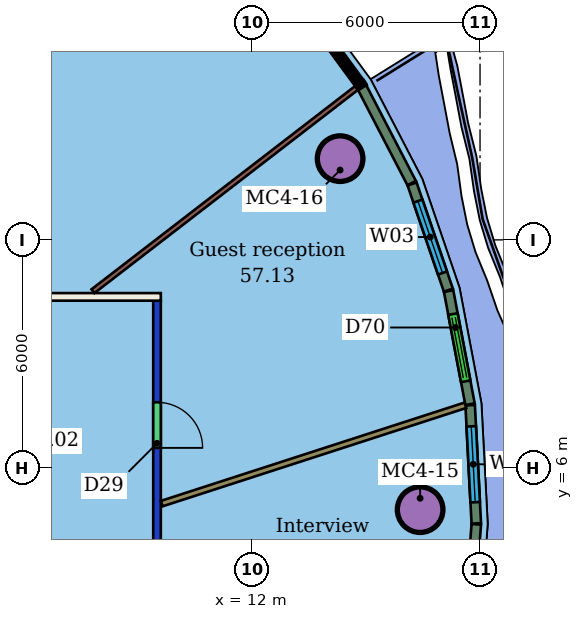
"""IFC4 building model, lengths in metres.
Left out: names, types, materials, properties, quantities, classifications, styles, units other than length and angle.
Written with IfcOpenShell. Run it as: python <this file> out.ifc"""

import sys

from ifc_helpers import new_model, si_unit, direction, frame, frame_2d, origin, origin_2d, place, context, subcontext, project, spatial, rectangle, hollow_circle, extrude, element, fill, save


model = new_model("IFC4")
c1 = context("Model", 3, precision=1e-05, world=origin(), true_north=direction((0.0, 1.0)))
c2 = subcontext(c1, "Body", "Model", "MODEL_VIEW")
j1 = project(units=[si_unit("LENGTHUNIT", "METRE"), si_unit("PLANEANGLEUNIT", "RADIAN")], contexts=[c1])
p1 = place(None, origin())
s1 = spatial("IfcSite", under=j1, at=p1, CompositionType="ELEMENT")
p2 = place(p1, origin())
s2 = spatial("IfcBuilding", under=s1, at=p2, CompositionType="ELEMENT")
p3 = place(p2, frame((0.0, 0.0, 231.7)))
s3 = spatial("IfcBuildingStorey", under=s2, at=p3, CompositionType="ELEMENT", Elevation=231.7)
for number, where, z_axis, x_axis in (
    (1, (16.424, 4.901, 0.0), (0.0, 0.0, 1.0), (1.0, 0.0, 0.0)),
    (2, (14.318, 14.137, 0.0), (0.0, 0.0, 1.0), (1.0, 0.0, 0.0)),
):
    element("IfcColumn", number, at=place(p3, frame(where, z_axis=z_axis, x_axis=x_axis)), inside=s3, PredefinedType="COLUMN", context=c2, shape_type="SweptSolid", body=[
        extrude(hollow_circle(Radius=0.6, WallThickness=0.045, at=origin_2d()), origin(), (0.0, 0.0, 1.0), 3.45),
    ])
p4 = place(p3, frame((-21.6, 10.5, 0.0), z_axis=(0.0, 0.0, 1.0), x_axis=(1.0, 0.0, 0.0)))
e3 = element("IfcWall", 3, at=p4, inside=s3, PredefinedType="PARTITIONING", context=c2, shape_type="SweptSolid", body=[
    extrude(rectangle(XDim=31.2, YDim=0.2, at=frame_2d((15.6, 0.0))), origin(), (0.0, 0.0, 1.0), 3.45),
])
p5 = place(p4, frame((10.934, 0.0, 0.0)))
e4 = element("IfcOpeningElement", 4, at=p5, cuts=e3, PredefinedType="OPENING", context=c2, shape_type="SweptSolid", body=[
    extrude(rectangle(XDim=1.0, YDim=2.4, at=frame_2d((0.5, 1.2))), frame((0.0, 0.11, 0.0), z_axis=(0.0, -1.0, 0.0), x_axis=(1.0, 0.0, 0.0)), (0.0, 0.0, 1.0), 0.22),
])
p6 = place(p4, frame((5.542, 0.0, 0.0)))
e5 = element("IfcOpeningElement", 5, at=p6, cuts=e3, PredefinedType="OPENING", context=c2, shape_type="SweptSolid", body=[
    extrude(rectangle(XDim=0.9, YDim=2.1, at=frame_2d((0.45, 1.05))), frame((0.0, 0.11, 0.0), z_axis=(0.0, -1.0, 0.0), x_axis=(1.0, 0.0, 0.0)), (0.0, 0.0, 1.0), 0.22),
])
p7 = place(p4, frame((19.472, 0.0, 0.0)))
e6 = element("IfcOpeningElement", 6, at=p7, cuts=e3, PredefinedType="OPENING", context=c2, shape_type="SweptSolid", body=[
    extrude(rectangle(XDim=1.8, YDim=2.1, at=frame_2d((0.9, 1.05))), frame((0.0, 0.11, 0.0), z_axis=(0.0, -1.0, 0.0), x_axis=(1.0, 0.0, 0.0)), (0.0, 0.0, 1.0), 0.22),
])
p8 = place(p3, frame((9.5, 10.4, 0.0), z_axis=(0.0, 0.0, 1.0), x_axis=(0.0, -1.0, 0.0)))
e7 = element("IfcWall", 7, at=p8, inside=s3, PredefinedType="PARTITIONING", context=c2, shape_type="SweptSolid", body=[
    extrude(rectangle(XDim=20.8, YDim=0.2, at=frame_2d((10.4, 0.0))), origin(), (0.0, 0.0, 1.0), 3.05),
])
p9 = place(p8, frame((15.989, 0.0, 0.0)))
e8 = element("IfcOpeningElement", 8, at=p9, cuts=e7, PredefinedType="OPENING", context=c2, shape_type="SweptSolid", body=[
    extrude(rectangle(XDim=1.0, YDim=2.4, at=frame_2d((0.5, 1.2))), frame((0.0, 0.11, 0.0), z_axis=(0.0, -1.0, 0.0), x_axis=(1.0, 0.0, 0.0)), (0.0, 0.0, 1.0), 0.22),
])
p10 = place(p8, frame((11.814, 0.0, 0.0)))
e9 = element("IfcOpeningElement", 9, at=p10, cuts=e7, PredefinedType="OPENING", context=c2, shape_type="SweptSolid", body=[
    extrude(rectangle(XDim=1.0, YDim=2.4, at=frame_2d((0.5, 1.2))), frame((0.0, 0.11, 0.0), z_axis=(0.0, -1.0, 0.0), x_axis=(1.0, 0.0, 0.0)), (0.0, 0.0, 1.0), 0.22),
])
p11 = place(p8, frame((6.499, 0.0, 0.0)))
e10 = element("IfcOpeningElement", 10, at=p11, cuts=e7, PredefinedType="OPENING", context=c2, shape_type="SweptSolid", body=[
    extrude(rectangle(XDim=0.9, YDim=2.1, at=frame_2d((0.45, 1.05))), frame((0.0, 0.11, 0.0), z_axis=(0.0, -1.0, 0.0), x_axis=(1.0, 0.0, 0.0)), (0.0, 0.0, 1.0), 0.22),
])
p12 = place(p8, frame((2.673, 0.0, 0.0)))
e11 = element("IfcOpeningElement", 11, at=p12, cuts=e7, PredefinedType="OPENING", context=c2, shape_type="SweptSolid", body=[
    extrude(rectangle(XDim=1.2, YDim=2.4, at=frame_2d((0.6, 1.2))), frame((0.0, 0.11, 0.0), z_axis=(0.0, -1.0, 0.0), x_axis=(1.0, 0.0, 0.0)), (0.0, 0.0, 1.0), 0.22),
])
p13 = place(p3, frame((17.615, 7.648, 0.0), z_axis=(0.0, 0.0, 1.0), x_axis=(-0.951351351351, -0.308108108108, 0.0)))
e12 = element("IfcWall", 12, at=p13, inside=s3, PredefinedType="PARTITIONING", context=c2, shape_type="SweptSolid", body=[
    extrude(rectangle(XDim=8.401, YDim=0.15, at=frame_2d((4.2, 0.0))), origin(), (0.0, 0.0, 1.0), 3.45),
])
p14 = place(p3, frame((14.759, 16.003, 0.0), z_axis=(0.0, 0.0, 1.0), x_axis=(-0.791981870626, -0.61054460656, 0.0)))
e13 = element("IfcWall", 13, at=p14, inside=s3, PredefinedType="PARTITIONING", context=c2, shape_type="SweptSolid", body=[
    extrude(rectangle(XDim=8.769, YDim=0.125, at=frame_2d((4.385, 0.0))), origin(), (0.0, 0.0, 1.0), 3.45),
])
p15 = place(p3, frame((17.657, 1.324, 0.0), z_axis=(0.0, 0.0, 1.0), x_axis=(0.076358161895, 0.997080453681, 0.0)))
e14 = element("IfcWall", 14, at=p15, inside=s3, PredefinedType="SOLIDWALL", context=c2, shape_type="SweptSolid", body=[
    extrude(rectangle(XDim=3.2, YDim=0.25, at=frame_2d((1.6, 0.0))), origin(), (0.0, 0.0, 1.0), 3.1),
])
p16 = place(p15, frame((0.6, 0.0, 0.9)))
e15 = element("IfcOpeningElement", 15, at=p16, cuts=e14, PredefinedType="OPENING", context=c2, shape_type="SweptSolid", body=[
    extrude(rectangle(XDim=2.0, YDim=2.1, at=frame_2d((1.0, 1.05))), frame((0.0, 0.135, 0.0), z_axis=(0.0, -1.0, 0.0), x_axis=(1.0, 0.0, 0.0)), (0.0, 0.0, 1.0), 0.27),
])
p17 = place(p3, frame((17.902, 4.54, 0.0), z_axis=(0.0, 0.0, 1.0), x_axis=(-0.051884190685, 0.99865310832, 0.0)))
e16 = element("IfcWall", 16, at=p17, inside=s3, PredefinedType="SOLIDWALL", context=c2, shape_type="SweptSolid", body=[
    extrude(rectangle(XDim=3.115, YDim=0.25, at=frame_2d((1.558, 0.0))), origin(), (0.0, 0.0, 1.0), 3.1),
])
p18 = place(p17, frame((0.558, 0.0, 0.9)))
e17 = element("IfcOpeningElement", 17, at=p18, cuts=e16, PredefinedType="OPENING", context=c2, shape_type="SweptSolid", body=[
    extrude(rectangle(XDim=2.0, YDim=2.1, at=frame_2d((1.0, 1.05))), frame((0.0, 0.135, 0.0), z_axis=(0.0, -1.0, 0.0), x_axis=(1.0, 0.0, 0.0)), (0.0, 0.0, 1.0), 0.27),
])
p19 = place(p3, frame((17.737, 7.675, 0.0), z_axis=(0.0, 0.0, 1.0), x_axis=(-0.186112401934, 0.982528459561, 0.0)))
e18 = element("IfcWall", 18, at=p19, inside=s3, PredefinedType="SOLIDWALL", context=c2, shape_type="SweptSolid", body=[
    extrude(rectangle(XDim=3.03, YDim=0.25, at=frame_2d((1.515, 0.0))), origin(), (0.0, 0.0, 1.0), 3.1),
])
p20 = place(p19, frame((0.615, 0.0, 0.0)))
e19 = element("IfcOpeningElement", 19, at=p20, cuts=e18, PredefinedType="OPENING", context=c2, shape_type="SweptSolid", body=[
    extrude(rectangle(XDim=1.8, YDim=2.4, at=frame_2d((0.9, 1.2))), frame((0.0, 0.135, 0.0), z_axis=(0.0, -1.0, 0.0), x_axis=(1.0, 0.0, 0.0)), (0.0, 0.0, 1.0), 0.27),
])
p21 = place(p3, frame((17.167, 10.677, 0.0), z_axis=(0.0, 0.0, 1.0), x_axis=(-0.32363701793, 0.946181314879, 0.0)))
e20 = element("IfcWall", 20, at=p21, inside=s3, PredefinedType="SOLIDWALL", context=c2, shape_type="SweptSolid", body=[
    extrude(rectangle(XDim=2.952, YDim=0.25, at=frame_2d((1.476, 0.0))), origin(), (0.0, 0.0, 1.0), 3.1),
])
p22 = place(p21, frame((0.476, 0.0, 0.9)))
e21 = element("IfcOpeningElement", 21, at=p22, cuts=e20, PredefinedType="OPENING", context=c2, shape_type="SweptSolid", body=[
    extrude(rectangle(XDim=2.0, YDim=2.1, at=frame_2d((1.0, 1.05))), frame((0.0, 0.135, 0.0), z_axis=(0.0, -1.0, 0.0), x_axis=(1.0, 0.0, 0.0)), (0.0, 0.0, 1.0), 0.27),
])
p23 = place(p3, frame((16.201, 13.495, 0.0), z_axis=(0.0, 0.0, 1.0), x_axis=(-0.460447402604, 0.887686988434, 0.0)))
e22 = element("IfcWall", 22, at=p23, inside=s3, PredefinedType="SOLIDWALL", context=c2, shape_type="SweptSolid", body=[
    extrude(rectangle(XDim=2.845, YDim=0.25, at=frame_2d((1.423, 0.0))), origin(), (0.0, 0.0, 1.0), 3.1),
])
p24 = place(p12, origin())
e23 = element("IfcDoor", 23, at=p24, inside=s3, OperationType="SINGLE_SWING_RIGHT", PredefinedType="DOOR", context=c2, shape_type="SweptSolid", body=[
    extrude(rectangle(XDim=1.2, YDim=2.4, at=frame_2d((0.6, 1.2))), frame((0.0, 0.025, 0.0), z_axis=(0.0, -1.0, 0.0), x_axis=(1.0, 0.0, 0.0)), (0.0, 0.0, 1.0), 0.05),
])
fill(e11, e23)
p25 = place(p18, origin())
e24 = element("IfcWindow", 24, at=p25, inside=s3, PartitioningType="SINGLE_PANEL", PredefinedType="WINDOW", context=c2, shape_type="SweptSolid", body=[
    extrude(rectangle(XDim=2.0, YDim=2.1, at=frame_2d((1.0, 1.05))), frame((0.0, 0.03, 0.0), z_axis=(0.0, -1.0, 0.0), x_axis=(1.0, 0.0, 0.0)), (0.0, 0.0, 1.0), 0.06),
])
fill(e17, e24)
p26 = place(p20, origin())
e25 = element("IfcDoor", 25, at=p26, inside=s3, OperationType="DOUBLE_DOOR_SLIDING", PredefinedType="DOOR", context=c2, shape_type="SweptSolid", body=[
    extrude(rectangle(XDim=1.8, YDim=2.4, at=frame_2d((0.9, 1.2))), frame((0.0, 0.025, 0.0), z_axis=(0.0, -1.0, 0.0), x_axis=(1.0, 0.0, 0.0)), (0.0, 0.0, 1.0), 0.05),
])
fill(e19, e25)
p27 = place(p22, origin())
e26 = element("IfcWindow", 26, at=p27, inside=s3, PartitioningType="SINGLE_PANEL", PredefinedType="WINDOW", context=c2, shape_type="SweptSolid", body=[
    extrude(rectangle(XDim=2.0, YDim=2.1, at=frame_2d((1.0, 1.05))), frame((0.0, 0.03, 0.0), z_axis=(0.0, -1.0, 0.0), x_axis=(1.0, 0.0, 0.0)), (0.0, 0.0, 1.0), 0.06),
])
fill(e21, e26)
save(model, sys.argv[1])
